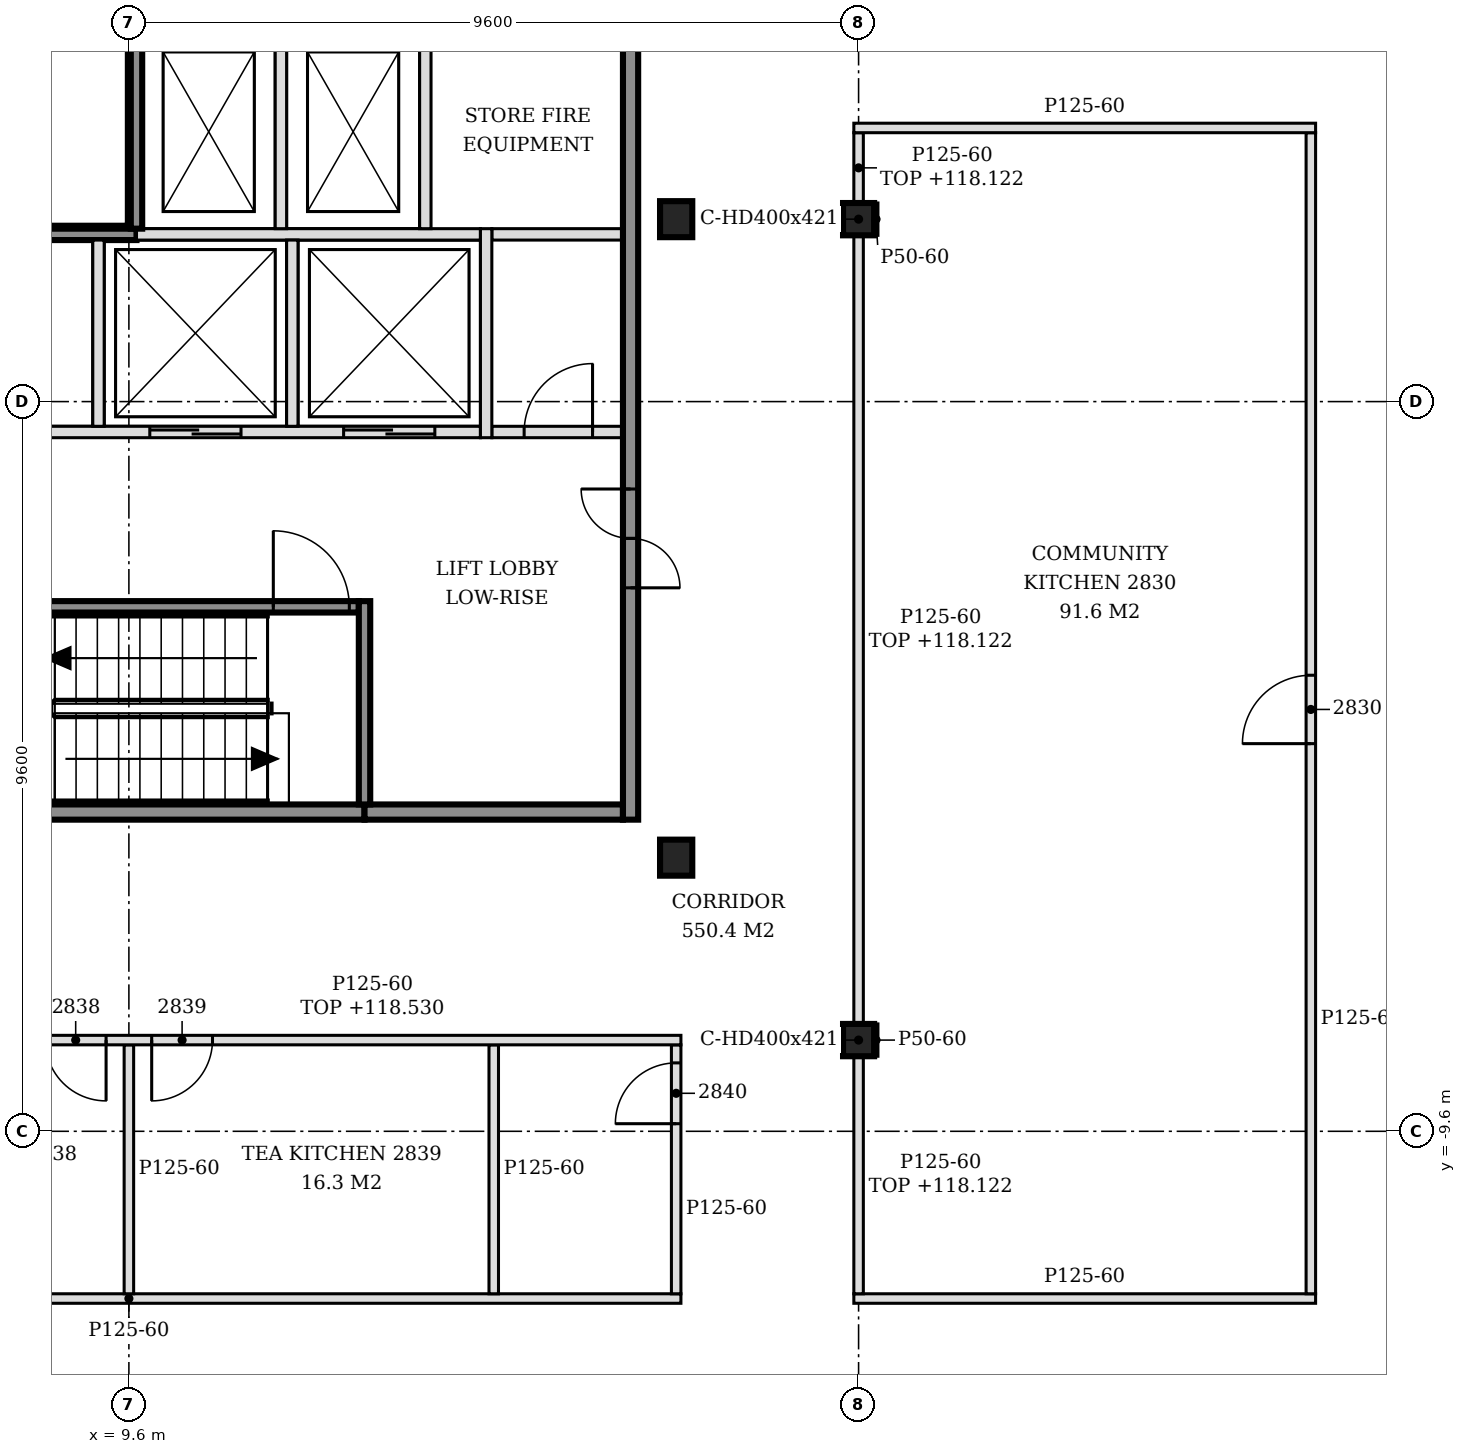
"""IFC4 building model, lengths in metres.
Left out: names, types, materials, properties, quantities, classifications, styles, units other than length and angle.
Written with IfcOpenShell. Run it as: python <this file> out.ifc"""

import sys

from ifc_helpers import new_model, si_unit, direction, frame, frame_2d, origin, origin_2d, place, context, subcontext, project, spatial, polyline, rectangle, i_section, outline, extrude, element, fill, save


model = new_model("IFC4")
c1 = context("Model", 3, precision=1e-05, world=origin(), true_north=direction((0.0, 1.0)))
c2 = subcontext(c1, "Body", "Model", "MODEL_VIEW")
j1 = project(units=[si_unit("LENGTHUNIT", "METRE"), si_unit("PLANEANGLEUNIT", "RADIAN")], contexts=[c1])
p1 = place(None, origin())
s1 = spatial("IfcSite", under=j1, at=p1, CompositionType="ELEMENT")
p2 = place(p1, origin())
s2 = spatial("IfcBuilding", under=s1, at=p2, CompositionType="ELEMENT")
p3 = place(p2, frame((0.0, 0.0, 115.8)))
s3 = spatial("IfcBuildingStorey", under=s2, at=p3, CompositionType="ELEMENT", Elevation=115.8)
for number, where, z_axis, x_axis in (
    (1, (19.2, -8.4, -0.15), (0.0, 0.0, 1.0), (1.0, 0.0, 0.0)),
    (2, (19.2, 2.4, -0.15), (0.0, 0.0, 1.0), (1.0, 0.0, 0.0)),
):
    element("IfcColumn", number, at=place(p3, frame(where, z_axis=z_axis, x_axis=x_axis)), inside=s3, PredefinedType="COLUMN", context=c2, shape_type="SweptSolid", body=[
        extrude(i_section(OverallWidth=0.409, OverallDepth=0.425, WebThickness=0.033, FlangeThickness=0.052, FilletRadius=0.015, at=origin_2d()), origin(), (0.0, 0.0, 1.0), 3.5),
    ])
for number, where, z_axis, x_axis in (
    (3, (16.8, -6.0, -0.15), (0.0, 0.0, 1.0), (1.0, 0.0, 0.0)),
    (4, (16.8, 2.4, -0.15), (0.0, 0.0, 1.0), (1.0, 0.0, 0.0)),
):
    element("IfcColumn", number, at=place(p3, frame(where, z_axis=z_axis, x_axis=x_axis)), inside=s3, PredefinedType="COLUMN", context=c2, shape_type="SweptSolid", body=[
        extrude(i_section(OverallWidth=0.424, OverallDepth=0.474, WebThickness=0.048, FlangeThickness=0.077, FilletRadius=0.015, at=origin_2d()), origin(), (0.0, 0.0, 1.0), 3.5),
    ])
p4 = place(p3, frame((6.2, -5.4, 0.0), z_axis=(0.0, 0.0, 1.0), x_axis=(1.0, 0.0, 0.0)))
e5 = element("IfcWall", 5, at=p4, inside=s3, PredefinedType="SOLIDWALL", context=c2, shape_type="SweptSolid", body=[
    extrude(rectangle(XDim=6.5, YDim=0.2, at=frame_2d((3.25, 0.0))), origin(), (0.0, 0.0, 1.0), 3.35),
])
p5 = place(p3, frame((12.7, -5.4, 0.0), z_axis=(0.0, 0.0, 1.0), x_axis=(1.0, 0.0, 0.0)))
e6 = element("IfcWall", 6, at=p5, inside=s3, PredefinedType="SOLIDWALL", context=c2, shape_type="SweptSolid", body=[
    extrude(rectangle(XDim=3.4, YDim=0.2, at=frame_2d((1.7, 0.0))), origin(), (0.0, 0.0, 1.0), 3.35),
])
p6 = place(p3, frame((6.2, -2.7, 0.0), z_axis=(0.0, 0.0, 1.0), x_axis=(1.0, 0.0, 0.0)))
e7 = element("IfcWall", 7, at=p6, inside=s3, PredefinedType="SOLIDWALL", context=c2, shape_type="SweptSolid", body=[
    extrude(rectangle(XDim=6.425, YDim=0.15, at=frame_2d((3.212, 0.0))), origin(), (0.0, 0.0, 1.0), 3.35),
])
p7 = place(p6, frame((5.3, 0.0, 0.0)))
e8 = element("IfcOpeningElement", 8, at=p7, cuts=e7, PredefinedType="OPENING", context=c2, shape_type="SweptSolid", body=[
    extrude(rectangle(XDim=1.0, YDim=2.1, at=frame_2d((0.5, 1.05))), frame((0.0, 0.085, 0.0), z_axis=(0.0, -1.0, 0.0), x_axis=(1.0, 0.0, 0.0)), (0.0, 0.0, 1.0), 0.17),
])
p8 = place(p3, frame((-1.7, -0.4, 0.0), z_axis=(0.0, 0.0, 1.0), x_axis=(1.0, 0.0, 0.0)))
e9 = element("IfcWall", 9, at=p8, inside=s3, PredefinedType="SOLIDWALL", context=c2, shape_type="SweptSolid", body=[
    extrude(rectangle(XDim=15.925, YDim=0.15, at=frame_2d((7.962, 0.0))), origin(), (0.0, 0.0, 1.0), 3.35),
])
p9 = place(p8, frame((0.6, 0.0, 0.0)))
e10 = element("IfcOpeningElement", 10, at=p9, cuts=e9, PredefinedType="OPENING", context=c2, shape_type="SweptSolid", body=[
    extrude(rectangle(XDim=1.1, YDim=2.1, at=frame_2d((0.55, 1.05))), frame((0.0, 0.085, 0.0), z_axis=(0.0, -1.0, 0.0), x_axis=(1.0, 0.0, 0.0)), (0.0, 0.0, 1.0), 0.17),
])
p10 = place(p8, frame((3.1, 0.0, 0.0)))
e11 = element("IfcOpeningElement", 11, at=p10, cuts=e9, PredefinedType="OPENING", context=c2, shape_type="SweptSolid", body=[
    extrude(rectangle(XDim=1.1, YDim=2.1, at=frame_2d((0.55, 1.05))), frame((0.0, 0.085, 0.0), z_axis=(0.0, -1.0, 0.0), x_axis=(1.0, 0.0, 0.0)), (0.0, 0.0, 1.0), 0.17),
])
p11 = place(p8, frame((11.575, 0.0, 0.0)))
e12 = element("IfcOpeningElement", 12, at=p11, cuts=e9, PredefinedType="OPENING", context=c2, shape_type="SweptSolid", body=[
    extrude(rectangle(XDim=1.2, YDim=2.1, at=frame_2d((0.6, 1.05))), frame((0.0, 0.085, 0.0), z_axis=(0.0, -1.0, 0.0), x_axis=(1.0, 0.0, 0.0)), (0.0, 0.0, 1.0), 0.17),
])
p12 = place(p8, frame((14.125, 0.0, 0.0)))
e13 = element("IfcOpeningElement", 13, at=p12, cuts=e9, PredefinedType="OPENING", context=c2, shape_type="SweptSolid", body=[
    extrude(rectangle(XDim=1.2, YDim=2.1, at=frame_2d((0.6, 1.05))), frame((0.0, 0.085, 0.0), z_axis=(0.0, -1.0, 0.0), x_axis=(1.0, 0.0, 0.0)), (0.0, 0.0, 1.0), 0.17),
])
p13 = place(p3, frame((14.375, -0.4, 0.0), z_axis=(0.0, 0.0, 1.0), x_axis=(1.0, 0.0, 0.0)))
e14 = element("IfcWall", 14, at=p13, inside=s3, PredefinedType="PARTITIONING", context=c2, shape_type="SweptSolid", body=[
    extrude(rectangle(XDim=1.725, YDim=0.15, at=frame_2d((0.863, 0.0))), origin(), (0.0, 0.0, 1.0), 3.35),
])
p14 = place(p13, frame((0.425, 0.0, 0.0)))
e15 = element("IfcOpeningElement", 15, at=p14, cuts=e14, PredefinedType="OPENING", context=c2, shape_type="SweptSolid", body=[
    extrude(rectangle(XDim=0.9, YDim=2.1, at=frame_2d((0.45, 1.05))), frame((0.0, 0.085, 0.0), z_axis=(0.0, -1.0, 0.0), x_axis=(1.0, 0.0, 0.0)), (0.0, 0.0, 1.0), 0.17),
])
p15 = place(p3, frame((3.2, 2.2, 0.0), z_axis=(0.0, 0.0, 1.0), x_axis=(1.0, 0.0, 0.0)))
e16 = element("IfcWall", 16, at=p15, inside=s3, PredefinedType="SOLIDWALL", context=c2, shape_type="SweptSolid", body=[
    extrude(rectangle(XDim=6.5, YDim=0.15, at=frame_2d((3.25, 0.0))), origin(), (0.0, 0.0, 1.0), 3.35),
])
p16 = place(p3, frame((9.7, 2.2, 0.0), z_axis=(0.0, 0.0, 1.0), x_axis=(1.0, 0.0, 0.0)))
e17 = element("IfcWall", 17, at=p16, inside=s3, PredefinedType="SOLIDWALL", context=c2, shape_type="SweptSolid", body=[
    extrude(rectangle(XDim=4.525, YDim=0.15, at=frame_2d((2.263, 0.0))), origin(), (0.0, 0.0, 1.0), 3.35),
])
p17 = place(p3, frame((14.375, 2.2, 0.0), z_axis=(0.0, 0.0, 1.0), x_axis=(1.0, 0.0, 0.0)))
e18 = element("IfcWall", 18, at=p17, inside=s3, PredefinedType="PARTITIONING", context=c2, shape_type="SweptSolid", body=[
    extrude(rectangle(XDim=1.725, YDim=0.15, at=frame_2d((0.863, 0.0))), origin(), (0.0, 0.0, 1.0), 3.35),
])
p18 = place(p3, frame((9.2, -0.325, 0.0), z_axis=(0.0, 0.0, 1.0), x_axis=(0.0, 1.0, 0.0)))
e19 = element("IfcWall", 19, at=p18, inside=s3, PredefinedType="SOLIDWALL", context=c2, shape_type="SweptSolid", body=[
    extrude(rectangle(XDim=2.45, YDim=0.15, at=frame_2d((1.225, 0.0))), origin(), (0.0, 0.0, 1.0), 3.35),
])
for number, where, z_axis, x_axis in (
    (20, (9.7, 2.275, 0.0), (0.0, 0.0, 1.0), (0.0, 1.0, 0.0)),
    (21, (11.6, 2.275, 0.0), (0.0, 0.0, 1.0), (0.0, 1.0, 0.0)),
):
    element("IfcWall", number, at=place(p3, frame(where, z_axis=z_axis, x_axis=x_axis)), inside=s3, PredefinedType="SOLIDWALL", context=c2, shape_type="SweptSolid", body=[
        extrude(rectangle(XDim=2.55, YDim=0.15, at=frame_2d((1.275, 0.0))), origin(), (0.0, 0.0, 1.0), 3.35),
    ])
p19 = place(p3, frame((11.75, -0.325, 0.0), z_axis=(0.0, 0.0, 1.0), x_axis=(0.0, 1.0, 0.0)))
e22 = element("IfcWall", 22, at=p19, inside=s3, PredefinedType="SOLIDWALL", context=c2, shape_type="SweptSolid", body=[
    extrude(rectangle(XDim=2.45, YDim=0.15, at=frame_2d((1.225, 0.0))), origin(), (0.0, 0.0, 1.0), 3.35),
])
p20 = place(p3, frame((12.7, -5.3, 0.0), z_axis=(0.0, 0.0, 1.0), x_axis=(0.0, 1.0, 0.0)))
e23 = element("IfcWall", 23, at=p20, inside=s3, PredefinedType="SOLIDWALL", context=c2, shape_type="SweptSolid", body=[
    extrude(rectangle(XDim=2.675, YDim=0.15, at=frame_2d((1.337, 0.0))), origin(), (0.0, 0.0, 1.0), 3.35),
])
p21 = place(p3, frame((13.5, 2.275, 0.0), z_axis=(0.0, 0.0, 1.0), x_axis=(0.0, 1.0, 0.0)))
e24 = element("IfcWall", 24, at=p21, inside=s3, PredefinedType="SOLIDWALL", context=c2, shape_type="SweptSolid", body=[
    extrude(rectangle(XDim=2.55, YDim=0.15, at=frame_2d((1.275, 0.0))), origin(), (0.0, 0.0, 1.0), 3.35),
])
p22 = place(p3, frame((14.3, -0.475, 0.0), z_axis=(0.0, 0.0, 1.0), x_axis=(0.0, 1.0, 0.0)))
e25 = element("IfcWall", 25, at=p22, inside=s3, PredefinedType="SOLIDWALL", context=c2, shape_type="SweptSolid", body=[
    extrude(rectangle(XDim=2.75, YDim=0.15, at=frame_2d((1.375, 0.0))), origin(), (0.0, 0.0, 1.0), 3.35),
])
p23 = place(p3, frame((16.2, -5.5, 0.0), z_axis=(0.0, 0.0, 1.0), x_axis=(0.0, 1.0, 0.0)))
e26 = element("IfcWall", 26, at=p23, inside=s3, PredefinedType="SOLIDWALL", context=c2, shape_type="SweptSolid", body=[
    extrude(rectangle(XDim=15.8, YDim=0.2, at=frame_2d((7.9, 0.0))), origin(), (0.0, 0.0, 1.0), 3.35),
])
p24 = place(p23, frame((3.05, 0.0, 0.0)))
e27 = element("IfcOpeningElement", 27, at=p24, cuts=e26, PredefinedType="OPENING", context=c2, shape_type="SweptSolid", body=[
    extrude(rectangle(XDim=1.3, YDim=2.1, at=frame_2d((0.65, 1.05))), frame((0.0, 0.11, 0.0), z_axis=(0.0, -1.0, 0.0), x_axis=(1.0, 0.0, 0.0)), (0.0, 0.0, 1.0), 0.22),
])
p25 = place(p23, frame((11.45, 0.0, 0.0)))
e28 = element("IfcOpeningElement", 28, at=p25, cuts=e26, PredefinedType="OPENING", context=c2, shape_type="SweptSolid", body=[
    extrude(rectangle(XDim=1.3, YDim=2.1, at=frame_2d((0.65, 1.05))), frame((0.0, 0.11, 0.0), z_axis=(0.0, -1.0, 0.0), x_axis=(1.0, 0.0, 0.0)), (0.0, 0.0, 1.0), 0.22),
])
p26 = place(p3, frame((2.337, -11.8, 0.0), z_axis=(0.0, 0.0, 1.0), x_axis=(1.0, 0.0, 0.0)))
e29 = element("IfcWall", 29, at=p26, inside=s3, PredefinedType="PARTITIONING", context=c2, shape_type="SweptSolid", body=[
    extrude(outline(polyline([(0.0, 0.0), (14.525, 0.0), (14.525, 3.35), (5.012, 3.35), (5.01, 2.83), (4.712, 2.83), (4.71, 3.35), (0.0, 3.35), (0.0, 0.0)])), frame((0.0, 0.062, 0.0), z_axis=(0.0, -1.0, 0.0), x_axis=(1.0, 0.0, 0.0)), (0.0, 0.0, 1.0), 0.125),
])
p27 = place(p3, frame((19.137, -11.8, 0.0), z_axis=(0.0, 0.0, 1.0), x_axis=(1.0, 0.0, 0.0)))
e30 = element("IfcWall", 30, at=p27, inside=s3, PredefinedType="PARTITIONING", context=c2, shape_type="SweptSolid", body=[
    extrude(outline(polyline([(0.0, 0.0), (6.075, 0.0), (6.075, 3.35), (0.213, 3.35), (0.211, 2.322), (0.0, 2.322), (0.0, 0.0)])), frame((0.0, 0.062, 0.0), z_axis=(0.0, -1.0, 0.0), x_axis=(1.0, 0.0, 0.0)), (0.0, 0.0, 1.0), 0.125),
])
for number, where, z_axis, x_axis in (
    (31, (9.6, -11.738, 0.0), (0.0, 0.0, 1.0), (0.0, 1.0, 0.0)),
    (32, (14.4, -11.738, 0.0), (0.0, 0.0, 1.0), (0.0, 1.0, 0.0)),
):
    element("IfcWall", number, at=place(p3, frame(where, z_axis=z_axis, x_axis=x_axis)), inside=s3, PredefinedType="PARTITIONING", context=c2, shape_type="SweptSolid", body=[
        extrude(outline(polyline([(0.0, 0.0), (3.275, 0.0), (3.275, 2.73), (3.188, 2.73), (3.186, 3.35), (0.0, 3.35), (0.0, 0.0)])), frame((0.0, 0.062, 0.0), z_axis=(0.0, -1.0, 0.0), x_axis=(1.0, 0.0, 0.0)), (0.0, 0.0, 1.0), 0.125),
    ])
p28 = place(p3, frame((16.8, -11.738, 0.0), z_axis=(0.0, 0.0, 1.0), x_axis=(0.0, 1.0, 0.0)))
e33 = element("IfcWall", 33, at=p28, inside=s3, PredefinedType="PARTITIONING", context=c2, shape_type="SweptSolid", body=[
    extrude(outline(polyline([(0.0, 0.0), (3.275, 0.0), (3.275, 2.73), (3.188, 2.73), (3.186, 3.35), (0.0, 3.35), (0.0, 0.0)])), frame((0.0, 0.062, 0.0), z_axis=(0.0, -1.0, 0.0), x_axis=(1.0, 0.0, 0.0)), (0.0, 0.0, 1.0), 0.125),
])
p29 = place(p28, frame((2.238, 0.0, 0.0)))
e34 = element("IfcOpeningElement", 34, at=p29, cuts=e33, PredefinedType="OPENING", context=c2, shape_type="SweptSolid", body=[
    extrude(rectangle(XDim=0.8, YDim=2.1, at=frame_2d((0.4, 1.05))), frame((0.0, 0.073, 0.0), z_axis=(0.0, -1.0, 0.0), x_axis=(1.0, 0.0, 0.0)), (0.0, 0.0, 1.0), 0.145),
])
p30 = place(p3, frame((19.2, -11.738, 0.0), z_axis=(0.0, 0.0, 1.0), x_axis=(0.0, 1.0, 0.0)))
e35 = element("IfcWall", 35, at=p30, inside=s3, PredefinedType="PARTITIONING", context=c2, shape_type="SweptSolid", body=[
    extrude(rectangle(XDim=3.125, YDim=0.125, at=frame_2d((1.562, 0.0))), origin(), (0.0, 0.0, 1.0), 2.322),
])
p31 = place(p3, frame((25.15, -11.738, 0.0), z_axis=(0.0, 0.0, 1.0), x_axis=(0.0, 1.0, 0.0)))
e36 = element("IfcWall", 36, at=p31, inside=s3, PredefinedType="PARTITIONING", context=c2, shape_type="SweptSolid", body=[
    extrude(outline(polyline([(0.0, 0.0), (15.275, 0.0), (15.275, 3.35), (12.238, 3.35), (12.236, 2.33), (11.238, 2.33), (11.236, 3.35), (7.048, 3.35), (7.045, 2.73), (6.827, 2.73), (6.825, 3.35), (2.248, 3.35), (2.246, 2.73), (2.028, 2.73), (2.025, 3.35), (0.0, 3.35), (0.0, 0.0)])), frame((0.0, 0.062, 0.0), z_axis=(0.0, -1.0, 0.0), x_axis=(1.0, 0.0, 0.0)), (0.0, 0.0, 1.0), 0.125),
])
p32 = place(p31, frame((7.238, 0.0, 0.0)))
e37 = element("IfcOpeningElement", 37, at=p32, cuts=e36, PredefinedType="OPENING", context=c2, shape_type="SweptSolid", body=[
    extrude(rectangle(XDim=0.9, YDim=2.1, at=frame_2d((0.45, 1.05))), frame((0.0, 0.073, 0.0), z_axis=(0.0, -1.0, 0.0), x_axis=(1.0, 0.0, 0.0)), (0.0, 0.0, 1.0), 0.145),
])
p33 = place(p3, frame((7.405, -8.4, 0.0), z_axis=(0.0, 0.0, 1.0), x_axis=(1.0, 0.0, 0.0)))
e38 = element("IfcWall", 38, at=p33, inside=s3, PredefinedType="PARTITIONING", context=c2, shape_type="SweptSolid", body=[
    extrude(rectangle(XDim=9.458, YDim=0.125, at=frame_2d((4.729, 0.0))), origin(), (0.0, 0.0, 1.0), 2.73),
])
p34 = place(p33, frame((1.095, 0.0, 0.0)))
e39 = element("IfcOpeningElement", 39, at=p34, cuts=e38, PredefinedType="OPENING", context=c2, shape_type="SweptSolid", body=[
    extrude(rectangle(XDim=0.8, YDim=2.1, at=frame_2d((0.4, 1.05))), frame((0.0, 0.073, 0.0), z_axis=(0.0, -1.0, 0.0), x_axis=(1.0, 0.0, 0.0)), (0.0, 0.0, 1.0), 0.145),
])
p35 = place(p33, frame((2.496, 0.0, 0.0)))
e40 = element("IfcOpeningElement", 40, at=p35, cuts=e38, PredefinedType="OPENING", context=c2, shape_type="SweptSolid", body=[
    extrude(rectangle(XDim=0.8, YDim=2.1, at=frame_2d((0.4, 1.05))), frame((0.0, 0.073, 0.0), z_axis=(0.0, -1.0, 0.0), x_axis=(1.0, 0.0, 0.0)), (0.0, 0.0, 1.0), 0.145),
])
p36 = place(p3, frame((19.2, -8.188, 0.0), z_axis=(0.0, 0.0, 1.0), x_axis=(0.0, 1.0, 0.0)))
e41 = element("IfcWall", 41, at=p36, inside=s3, PredefinedType="PARTITIONING", context=c2, shape_type="SweptSolid", body=[
    extrude(rectangle(XDim=10.375, YDim=0.125, at=frame_2d((5.188, 0.0))), origin(), (0.0, 0.0, 1.0), 2.322),
])
p37 = place(p3, frame((19.2, 2.613, 0.0), z_axis=(0.0, 0.0, 1.0), x_axis=(0.0, 1.0, 0.0)))
e42 = element("IfcWall", 42, at=p37, inside=s3, PredefinedType="PARTITIONING", context=c2, shape_type="SweptSolid", body=[
    extrude(rectangle(XDim=0.925, YDim=0.125, at=frame_2d((0.462, 0.0))), origin(), (0.0, 0.0, 1.0), 2.322),
])
p38 = place(p3, frame((19.137, 3.6, 0.0), z_axis=(0.0, 0.0, 1.0), x_axis=(1.0, 0.0, 0.0)))
e43 = element("IfcWall", 43, at=p38, inside=s3, PredefinedType="PARTITIONING", context=c2, shape_type="SweptSolid", body=[
    extrude(outline(polyline([(0.0, 0.0), (6.075, 0.0), (6.075, 3.35), (0.213, 3.35), (0.211, 2.322), (0.0, 2.322), (0.0, 0.0)])), frame((0.0, 0.062, 0.0), z_axis=(0.0, -1.0, 0.0), x_axis=(1.0, 0.0, 0.0)), (0.0, 0.0, 1.0), 0.125),
])
for number, where, z_axis, x_axis in (
    (44, (19.429, -8.613, 0.0), (0.0, 0.0, 1.0), (0.0, 1.0, 0.0)),
    (45, (19.429, 2.188, 0.0), (0.0, 0.0, 1.0), (0.0, 1.0, 0.0)),
):
    element("IfcWall", number, at=place(p3, frame(where, z_axis=z_axis, x_axis=x_axis)), inside=s3, PredefinedType="PARTITIONING", context=c2, shape_type="SweptSolid", body=[
        extrude(rectangle(XDim=0.425, YDim=0.05, at=frame_2d((0.212, 0.0))), origin(), (0.0, 0.0, 1.0), 3.35),
    ])
p39 = place(p11, origin())
e46 = element("IfcDoor", 46, at=p39, inside=s3, OperationType="DOUBLE_DOOR_SLIDING", PredefinedType="DOOR", context=c2, shape_type="SweptSolid", body=[
    extrude(rectangle(XDim=1.2, YDim=2.1, at=frame_2d((0.6, 1.05))), frame((0.0, 0.025, 0.0), z_axis=(0.0, -1.0, 0.0), x_axis=(1.0, 0.0, 0.0)), (0.0, 0.0, 1.0), 0.05),
])
fill(e12, e46)
p40 = place(p12, origin())
e47 = element("IfcDoor", 47, at=p40, inside=s3, OperationType="DOUBLE_DOOR_SLIDING", PredefinedType="DOOR", context=c2, shape_type="SweptSolid", body=[
    extrude(rectangle(XDim=1.2, YDim=2.1, at=frame_2d((0.6, 1.05))), frame((0.0, 0.025, 0.0), z_axis=(0.0, -1.0, 0.0), x_axis=(1.0, 0.0, 0.0)), (0.0, 0.0, 1.0), 0.05),
])
fill(e13, e47)
p41 = place(p7, origin())
e48 = element("IfcDoor", 48, at=p41, inside=s3, OperationType="SINGLE_SWING_LEFT", PredefinedType="DOOR", context=c2, shape_type="SweptSolid", body=[
    extrude(rectangle(XDim=1.0, YDim=2.1, at=frame_2d((0.5, 1.05))), frame((0.0, 0.025, 0.0), z_axis=(0.0, -1.0, 0.0), x_axis=(1.0, 0.0, 0.0)), (0.0, 0.0, 1.0), 0.05),
])
fill(e8, e48)
p42 = place(p24, origin())
e49 = element("IfcDoor", 49, at=p42, inside=s3, OperationType="DOUBLE_DOOR_SINGLE_SWING", PredefinedType="DOOR", context=c2, shape_type="SweptSolid", body=[
    extrude(rectangle(XDim=1.3, YDim=2.1, at=frame_2d((0.65, 1.05))), frame((0.0, 0.025, 0.0), z_axis=(0.0, -1.0, 0.0), x_axis=(1.0, 0.0, 0.0)), (0.0, 0.0, 1.0), 0.05),
])
fill(e27, e49)
p43 = place(p14, origin())
e50 = element("IfcDoor", 50, at=p43, inside=s3, OperationType="SINGLE_SWING_RIGHT", PredefinedType="DOOR", context=c2, shape_type="SweptSolid", body=[
    extrude(rectangle(XDim=0.9, YDim=2.1, at=frame_2d((0.45, 1.05))), frame((0.0, 0.025, 0.0), z_axis=(0.0, -1.0, 0.0), x_axis=(1.0, 0.0, 0.0)), (0.0, 0.0, 1.0), 0.05),
])
fill(e15, e50)
p44 = place(p32, origin())
e51 = element("IfcDoor", 51, at=p44, inside=s3, OperationType="SINGLE_SWING_LEFT", PredefinedType="DOOR", context=c2, shape_type="SweptSolid", body=[
    extrude(rectangle(XDim=0.9, YDim=2.1, at=frame_2d((0.45, 1.05))), frame((0.0, 0.025, 0.0), z_axis=(0.0, -1.0, 0.0), x_axis=(1.0, 0.0, 0.0)), (0.0, 0.0, 1.0), 0.05),
])
fill(e37, e51)
p45 = place(p34, frame((0.8, 0.0, 0.0), z_axis=(0.0, 0.0, 1.0), x_axis=(-1.0, 0.0, 0.0)))
e52 = element("IfcDoor", 52, at=p45, inside=s3, OperationType="SINGLE_SWING_LEFT", PredefinedType="DOOR", context=c2, shape_type="SweptSolid", body=[
    extrude(rectangle(XDim=0.8, YDim=2.1, at=frame_2d((0.4, 1.05))), frame((0.0, 0.025, 0.0), z_axis=(0.0, -1.0, 0.0), x_axis=(1.0, 0.0, 0.0)), (0.0, 0.0, 1.0), 0.05),
])
fill(e39, e52)
p46 = place(p35, frame((0.8, 0.0, 0.0), z_axis=(0.0, 0.0, 1.0), x_axis=(-1.0, 0.0, 0.0)))
e53 = element("IfcDoor", 53, at=p46, inside=s3, OperationType="SINGLE_SWING_RIGHT", PredefinedType="DOOR", context=c2, shape_type="SweptSolid", body=[
    extrude(rectangle(XDim=0.8, YDim=2.1, at=frame_2d((0.4, 1.05))), frame((0.0, 0.025, 0.0), z_axis=(0.0, -1.0, 0.0), x_axis=(1.0, 0.0, 0.0)), (0.0, 0.0, 1.0), 0.05),
])
fill(e40, e53)
p47 = place(p29, origin())
e54 = element("IfcDoor", 54, at=p47, inside=s3, OperationType="SINGLE_SWING_LEFT", PredefinedType="DOOR", context=c2, shape_type="SweptSolid", body=[
    extrude(rectangle(XDim=0.8, YDim=2.1, at=frame_2d((0.4, 1.05))), frame((0.0, 0.025, 0.0), z_axis=(0.0, -1.0, 0.0), x_axis=(1.0, 0.0, 0.0)), (0.0, 0.0, 1.0), 0.05),
])
fill(e34, e54)
save(model, sys.argv[1])
